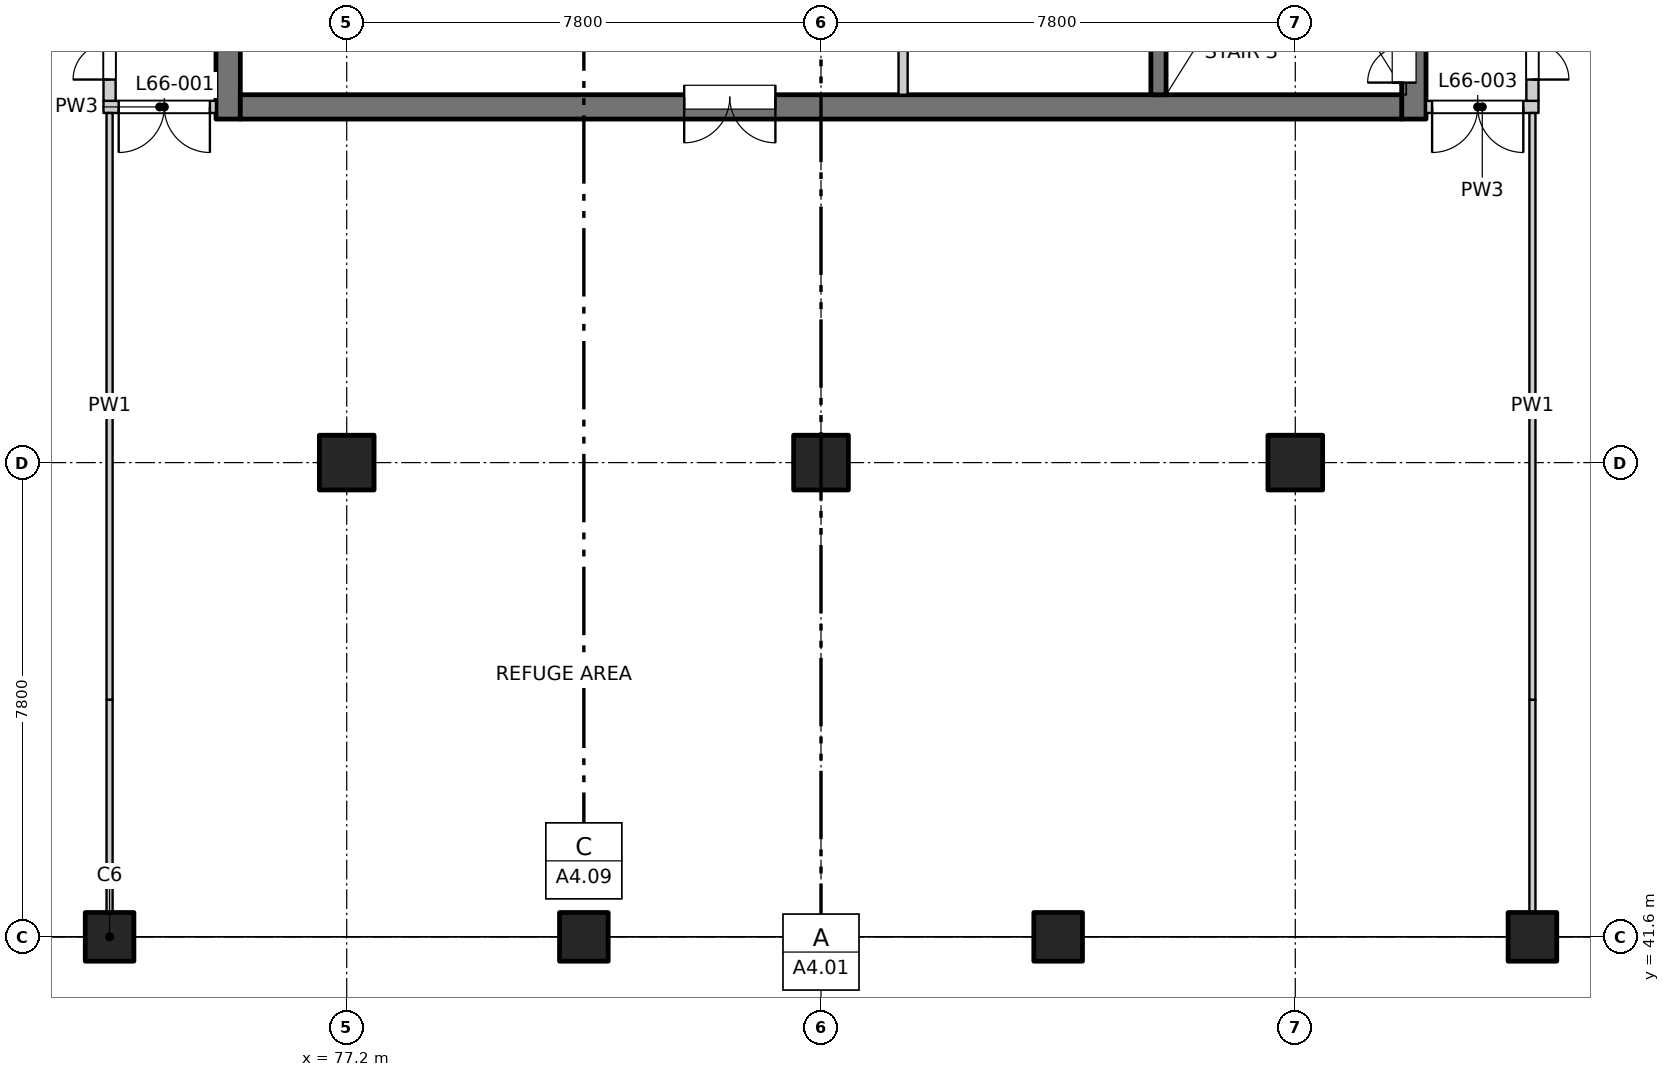
"""IFC4 building model, lengths in metres.
Left out: names, types, materials, properties, quantities, classifications, styles, units other than length and angle.
Written with IfcOpenShell. Run it as: python <this file> out.ifc"""

import sys

from ifc_helpers import new_model, si_unit, direction, frame, frame_2d, origin, origin_2d, place, context, subcontext, project, spatial, rectangle, extrude, element, fill, save


model = new_model("IFC4")
c1 = context("Model", 3, precision=1e-05, world=origin(), true_north=direction((0.0, 1.0)))
c2 = subcontext(c1, "Body", "Model", "MODEL_VIEW")
j1 = project(units=[si_unit("LENGTHUNIT", "METRE"), si_unit("PLANEANGLEUNIT", "RADIAN")], contexts=[c1])
p1 = place(None, origin())
s1 = spatial("IfcSite", under=j1, at=p1, CompositionType="ELEMENT")
p2 = place(p1, origin())
s2 = spatial("IfcBuilding", under=s1, at=p2, CompositionType="ELEMENT")
p3 = place(p2, frame((0.0, 0.0, 241.5)))
s3 = spatial("IfcBuildingStorey", under=s2, at=p3, CompositionType="ELEMENT", Elevation=241.5)
for number, where, z_axis, x_axis in (
    (1, (73.3, 41.6, -0.3), (0.0, 0.0, 1.0), (1.0, 0.0, 0.0)),
    (2, (81.1, 41.6, -0.3), (0.0, 0.0, 1.0), (1.0, 0.0, 0.0)),
    (3, (88.9, 41.6, -0.3), (0.0, 0.0, 1.0), (1.0, 0.0, 0.0)),
    (4, (96.7, 41.6, -0.3), (0.0, 0.0, 1.0), (1.0, 0.0, 0.0)),
):
    element("IfcColumn", number, at=place(p3, frame(where, z_axis=z_axis, x_axis=x_axis)), inside=s3, PredefinedType="COLUMN", context=c2, shape_type="SweptSolid", body=[
        extrude(rectangle(XDim=0.8, YDim=0.8, at=origin_2d()), origin(), (0.0, 0.0, 1.0), 4.5),
    ])
for number, where, z_axis, x_axis in (
    (5, (77.2, 49.4, -0.3), (0.0, 0.0, 1.0), (1.0, 0.0, 0.0)),
    (6, (85.0, 49.4, -0.3), (0.0, 0.0, 1.0), (1.0, 0.0, 0.0)),
    (7, (92.8, 49.4, -0.3), (0.0, 0.0, 1.0), (1.0, 0.0, 0.0)),
):
    element("IfcColumn", number, at=place(p3, frame(where, z_axis=z_axis, x_axis=x_axis)), inside=s3, PredefinedType="COLUMN", context=c2, shape_type="SweptSolid", body=[
        extrude(rectangle(XDim=0.9, YDim=0.9, at=origin_2d()), origin(), (0.0, 0.0, 1.0), 4.5),
    ])
p4 = place(p3, frame((75.25, 55.05, -0.3), z_axis=(0.0, 0.0, 1.0), x_axis=(0.0, 1.0, 0.0)))
e8 = element("IfcWall", 8, at=p4, inside=s3, PredefinedType="SOLIDWALL", context=c2, shape_type="SweptSolid", body=[
    extrude(rectangle(XDim=22.25, YDim=0.4, at=frame_2d((11.125, 0.0))), origin(), (0.0, 0.0, 1.0), 4.5),
])
p5 = place(p4, frame((7.4, 0.0, 0.3)))
e9 = element("IfcOpeningElement", 9, at=p5, cuts=e8, PredefinedType="OPENING", context=c2, shape_type="SweptSolid", body=[
    extrude(rectangle(XDim=0.9, YDim=2.1, at=frame_2d((0.45, 1.05))), frame((0.0, 0.21, 0.0), z_axis=(0.0, -1.0, 0.0), x_axis=(1.0, 0.0, 0.0)), (0.0, 0.0, 1.0), 0.42),
])
p6 = place(p4, frame((10.7, 0.0, 0.3)))
e10 = element("IfcOpeningElement", 10, at=p6, cuts=e8, PredefinedType="OPENING", context=c2, shape_type="SweptSolid", body=[
    extrude(rectangle(XDim=0.9, YDim=2.1, at=frame_2d((0.45, 1.05))), frame((0.0, 0.21, 0.0), z_axis=(0.0, -1.0, 0.0), x_axis=(1.0, 0.0, 0.0)), (0.0, 0.0, 1.0), 0.42),
])
p7 = place(p4, frame((15.2, 0.0, 0.3)))
e11 = element("IfcOpeningElement", 11, at=p7, cuts=e8, PredefinedType="OPENING", context=c2, shape_type="SweptSolid", body=[
    extrude(rectangle(XDim=0.9, YDim=2.1, at=frame_2d((0.45, 1.05))), frame((0.0, 0.21, 0.0), z_axis=(0.0, -1.0, 0.0), x_axis=(1.0, 0.0, 0.0)), (0.0, 0.0, 1.0), 0.42),
])
p8 = place(p4, frame((20.0, 0.0, 0.3)))
e12 = element("IfcOpeningElement", 12, at=p8, cuts=e8, PredefinedType="OPENING", context=c2, shape_type="SweptSolid", body=[
    extrude(rectangle(XDim=0.9, YDim=2.1, at=frame_2d((0.45, 1.05))), frame((0.0, 0.21, 0.0), z_axis=(0.0, -1.0, 0.0), x_axis=(1.0, 0.0, 0.0)), (0.0, 0.0, 1.0), 0.42),
])
p9 = place(p3, frame((94.75, 55.05, -0.3), z_axis=(0.0, 0.0, 1.0), x_axis=(0.0, 1.0, 0.0)))
e13 = element("IfcWall", 13, at=p9, inside=s3, PredefinedType="SOLIDWALL", context=c2, shape_type="SweptSolid", body=[
    extrude(rectangle(XDim=6.9, YDim=0.4, at=frame_2d((3.45, 0.0))), origin(), (0.0, 0.0, 1.0), 4.5),
])
p10 = place(p9, frame((0.6, 0.0, 0.3)))
e14 = element("IfcOpeningElement", 14, at=p10, cuts=e13, PredefinedType="OPENING", context=c2, shape_type="SweptSolid", body=[
    extrude(rectangle(XDim=1.2, YDim=2.1, at=frame_2d((0.6, 1.05))), frame((0.0, 0.21, 0.0), z_axis=(0.0, -1.0, 0.0), x_axis=(1.0, 0.0, 0.0)), (0.0, 0.0, 1.0), 0.42),
])
p11 = place(p3, frame((75.45, 55.25, -0.3), z_axis=(0.0, 0.0, 1.0), x_axis=(1.0, 0.0, 0.0)))
e15 = element("IfcWall", 15, at=p11, inside=s3, PredefinedType="SOLIDWALL", context=c2, shape_type="SweptSolid", body=[
    extrude(rectangle(XDim=19.1, YDim=0.4, at=frame_2d((9.55, 0.0))), origin(), (0.0, 0.0, 1.0), 4.5),
])
p12 = place(p11, frame((7.3, 0.0, 0.3)))
e16 = element("IfcOpeningElement", 16, at=p12, cuts=e15, PredefinedType="OPENING", context=c2, shape_type="SweptSolid", body=[
    extrude(rectangle(XDim=1.5, YDim=2.1, at=frame_2d((0.75, 1.05))), frame((0.0, 0.21, 0.0), z_axis=(0.0, -1.0, 0.0), x_axis=(1.0, 0.0, 0.0)), (0.0, 0.0, 1.0), 0.42),
])
p13 = place(p3, frame((90.55, 55.45, -0.3), z_axis=(0.0, 0.0, 1.0), x_axis=(0.0, 1.0, 0.0)))
e17 = element("IfcWall", 17, at=p13, inside=s3, PredefinedType="SOLIDWALL", context=c2, shape_type="SweptSolid", body=[
    extrude(rectangle(XDim=6.5, YDim=0.25, at=frame_2d((3.25, 0.0))), origin(), (0.0, 0.0, 1.0), 4.5),
])
p14 = place(p3, frame((73.2, 55.25, 0.0), z_axis=(0.0, 0.0, 1.0), x_axis=(1.0, 0.0, 0.0)))
e18 = element("IfcWall", 18, at=p14, inside=s3, PredefinedType="PARTITIONING", context=c2, shape_type="SweptSolid", body=[
    extrude(rectangle(XDim=1.85, YDim=0.2, at=frame_2d((0.925, 0.0))), origin(), (0.0, 0.0, 1.0), 4.2),
])
p15 = place(p14, frame((0.25, 0.0, 0.0)))
e19 = element("IfcOpeningElement", 19, at=p15, cuts=e18, PredefinedType="OPENING", context=c2, shape_type="SweptSolid", body=[
    extrude(rectangle(XDim=1.5, YDim=2.1, at=frame_2d((0.75, 1.05))), frame((0.0, 0.11, 0.0), z_axis=(0.0, -1.0, 0.0), x_axis=(1.0, 0.0, 0.0)), (0.0, 0.0, 1.0), 0.22),
])
p16 = place(p3, frame((94.95, 55.25, 0.0), z_axis=(0.0, 0.0, 1.0), x_axis=(1.0, 0.0, 0.0)))
e20 = element("IfcWall", 20, at=p16, inside=s3, PredefinedType="PARTITIONING", context=c2, shape_type="SweptSolid", body=[
    extrude(rectangle(XDim=1.85, YDim=0.2, at=frame_2d((0.925, 0.0))), origin(), (0.0, 0.0, 1.0), 4.2),
])
p17 = place(p16, frame((0.1, 0.0, 0.0)))
e21 = element("IfcOpeningElement", 21, at=p17, cuts=e20, PredefinedType="OPENING", context=c2, shape_type="SweptSolid", body=[
    extrude(rectangle(XDim=1.5, YDim=2.1, at=frame_2d((0.75, 1.05))), frame((0.0, 0.11, 0.0), z_axis=(0.0, -1.0, 0.0), x_axis=(1.0, 0.0, 0.0)), (0.0, 0.0, 1.0), 0.22),
])
p18 = place(p3, frame((73.3, 41.6, 0.0), z_axis=(0.0, 0.0, 1.0), x_axis=(0.0, 1.0, 0.0)))
e22 = element("IfcWall", 22, at=p18, inside=s3, PredefinedType="PARTITIONING", context=c2, shape_type="SweptSolid", body=[
    extrude(rectangle(XDim=3.9, YDim=0.1, at=frame_2d((1.95, 0.0))), origin(), (0.0, 0.0, 1.0), 2.6),
])
p19 = place(p3, frame((73.3, 45.5, 0.0), z_axis=(0.0, 0.0, 1.0), x_axis=(0.0, 1.0, 0.0)))
e23 = element("IfcWall", 23, at=p19, inside=s3, PredefinedType="PARTITIONING", context=c2, shape_type="SweptSolid", body=[
    extrude(rectangle(XDim=9.65, YDim=0.1, at=frame_2d((4.825, 0.0))), origin(), (0.0, 0.0, 1.0), 4.2),
])
p20 = place(p3, frame((73.3, 55.35, 0.0), z_axis=(0.0, 0.0, 1.0), x_axis=(0.0, 1.0, 0.0)))
e24 = element("IfcWall", 24, at=p20, inside=s3, PredefinedType="PARTITIONING", context=c2, shape_type="SweptSolid", body=[
    extrude(rectangle(XDim=29.15, YDim=0.2, at=frame_2d((14.575, 0.0))), origin(), (0.0, 0.0, 1.0), 4.2),
])
p21 = place(p20, frame((0.35, 0.0, 0.0)))
e25 = element("IfcOpeningElement", 25, at=p21, cuts=e24, PredefinedType="OPENING", context=c2, shape_type="SweptSolid", body=[
    extrude(rectangle(XDim=1.2, YDim=2.1, at=frame_2d((0.6, 1.05))), frame((0.0, 0.11, 0.0), z_axis=(0.0, -1.0, 0.0), x_axis=(1.0, 0.0, 0.0)), (0.0, 0.0, 1.0), 0.22),
])
p22 = place(p20, frame((7.1, 0.0, 0.0)))
e26 = element("IfcOpeningElement", 26, at=p22, cuts=e24, PredefinedType="OPENING", context=c2, shape_type="SweptSolid", body=[
    extrude(rectangle(XDim=1.2, YDim=2.1, at=frame_2d((0.6, 1.05))), frame((0.0, 0.11, 0.0), z_axis=(0.0, -1.0, 0.0), x_axis=(1.0, 0.0, 0.0)), (0.0, 0.0, 1.0), 0.22),
])
p23 = place(p20, frame((18.8, 0.0, 0.0)))
e27 = element("IfcOpeningElement", 27, at=p23, cuts=e24, PredefinedType="OPENING", context=c2, shape_type="SweptSolid", body=[
    extrude(rectangle(XDim=1.2, YDim=2.1, at=frame_2d((0.6, 1.05))), frame((0.0, 0.11, 0.0), z_axis=(0.0, -1.0, 0.0), x_axis=(1.0, 0.0, 0.0)), (0.0, 0.0, 1.0), 0.22),
])
p24 = place(p20, frame((26.6, 0.0, 0.0)))
e28 = element("IfcOpeningElement", 28, at=p24, cuts=e24, PredefinedType="OPENING", context=c2, shape_type="SweptSolid", body=[
    extrude(rectangle(XDim=1.2, YDim=2.1, at=frame_2d((0.6, 1.05))), frame((0.0, 0.11, 0.0), z_axis=(0.0, -1.0, 0.0), x_axis=(1.0, 0.0, 0.0)), (0.0, 0.0, 1.0), 0.22),
])
p25 = place(p3, frame((86.35, 55.45, 0.0), z_axis=(0.0, 0.0, 1.0), x_axis=(0.0, 1.0, 0.0)))
e29 = element("IfcWall", 29, at=p25, inside=s3, PredefinedType="PARTITIONING", context=c2, shape_type="SweptSolid", body=[
    extrude(rectangle(XDim=5.575, YDim=0.15, at=frame_2d((2.788, 0.0))), origin(), (0.0, 0.0, 1.0), 4.2),
])
p26 = place(p25, frame((2.25, 0.0, 0.0)))
e30 = element("IfcOpeningElement", 30, at=p26, cuts=e29, PredefinedType="OPENING", context=c2, shape_type="SweptSolid", body=[
    extrude(rectangle(XDim=0.9, YDim=2.1, at=frame_2d((0.45, 1.05))), frame((0.0, 0.085, 0.0), z_axis=(0.0, -1.0, 0.0), x_axis=(1.0, 0.0, 0.0)), (0.0, 0.0, 1.0), 0.17),
])
p27 = place(p3, frame((96.7, 41.6, 0.0), z_axis=(0.0, 0.0, 1.0), x_axis=(0.0, 1.0, 0.0)))
e31 = element("IfcWall", 31, at=p27, inside=s3, PredefinedType="PARTITIONING", context=c2, shape_type="SweptSolid", body=[
    extrude(rectangle(XDim=3.9, YDim=0.1, at=frame_2d((1.95, 0.0))), origin(), (0.0, 0.0, 1.0), 2.6),
])
p28 = place(p3, frame((96.7, 45.5, 0.0), z_axis=(0.0, 0.0, 1.0), x_axis=(0.0, 1.0, 0.0)))
e32 = element("IfcWall", 32, at=p28, inside=s3, PredefinedType="PARTITIONING", context=c2, shape_type="SweptSolid", body=[
    extrude(rectangle(XDim=9.65, YDim=0.1, at=frame_2d((4.825, 0.0))), origin(), (0.0, 0.0, 1.0), 4.2),
])
p29 = place(p3, frame((96.7, 55.35, 0.0), z_axis=(0.0, 0.0, 1.0), x_axis=(0.0, 1.0, 0.0)))
e33 = element("IfcWall", 33, at=p29, inside=s3, PredefinedType="PARTITIONING", context=c2, shape_type="SweptSolid", body=[
    extrude(rectangle(XDim=29.15, YDim=0.2, at=frame_2d((14.575, 0.0))), origin(), (0.0, 0.0, 1.0), 4.2),
])
p30 = place(p29, frame((0.35, 0.0, 0.0)))
e34 = element("IfcOpeningElement", 34, at=p30, cuts=e33, PredefinedType="OPENING", context=c2, shape_type="SweptSolid", body=[
    extrude(rectangle(XDim=1.2, YDim=2.1, at=frame_2d((0.6, 1.05))), frame((0.0, 0.11, 0.0), z_axis=(0.0, -1.0, 0.0), x_axis=(1.0, 0.0, 0.0)), (0.0, 0.0, 1.0), 0.22),
])
p31 = place(p29, frame((3.2, 0.0, 0.0)))
e35 = element("IfcOpeningElement", 35, at=p31, cuts=e33, PredefinedType="OPENING", context=c2, shape_type="SweptSolid", body=[
    extrude(rectangle(XDim=1.2, YDim=2.1, at=frame_2d((0.6, 1.05))), frame((0.0, 0.11, 0.0), z_axis=(0.0, -1.0, 0.0), x_axis=(1.0, 0.0, 0.0)), (0.0, 0.0, 1.0), 0.22),
])
p32 = place(p29, frame((22.7, 0.0, 0.0)))
e36 = element("IfcOpeningElement", 36, at=p32, cuts=e33, PredefinedType="OPENING", context=c2, shape_type="SweptSolid", body=[
    extrude(rectangle(XDim=1.2, YDim=2.1, at=frame_2d((0.6, 1.05))), frame((0.0, 0.11, 0.0), z_axis=(0.0, -1.0, 0.0), x_axis=(1.0, 0.0, 0.0)), (0.0, 0.0, 1.0), 0.22),
])
p33 = place(p15, origin())
e37 = element("IfcDoor", 37, at=p33, inside=s3, OperationType="DOUBLE_DOOR_SINGLE_SWING", PredefinedType="DOOR", context=c2, shape_type="SweptSolid", body=[
    extrude(rectangle(XDim=1.5, YDim=2.1, at=frame_2d((0.75, 1.05))), frame((0.0, 0.025, 0.0), z_axis=(0.0, -1.0, 0.0), x_axis=(1.0, 0.0, 0.0)), (0.0, 0.0, 1.0), 0.05),
])
fill(e19, e37)
p34 = place(p12, origin())
e38 = element("IfcDoor", 38, at=p34, inside=s3, OperationType="DOUBLE_DOOR_SINGLE_SWING", PredefinedType="DOOR", context=c2, shape_type="SweptSolid", body=[
    extrude(rectangle(XDim=1.5, YDim=2.1, at=frame_2d((0.75, 1.05))), frame((0.0, 0.185, 0.0), z_axis=(0.0, -1.0, 0.0), x_axis=(1.0, 0.0, 0.0)), (0.0, 0.0, 1.0), 0.05),
])
fill(e16, e38)
p35 = place(p17, origin())
e39 = element("IfcDoor", 39, at=p35, inside=s3, OperationType="DOUBLE_DOOR_SINGLE_SWING", PredefinedType="DOOR", context=c2, shape_type="SweptSolid", body=[
    extrude(rectangle(XDim=1.5, YDim=2.1, at=frame_2d((0.75, 1.05))), frame((0.0, 0.025, 0.0), z_axis=(0.0, -1.0, 0.0), x_axis=(1.0, 0.0, 0.0)), (0.0, 0.0, 1.0), 0.05),
])
fill(e21, e39)
p36 = place(p10, origin())
e40 = element("IfcDoor", 40, at=p36, inside=s3, OperationType="DOUBLE_DOOR_SINGLE_SWING", PredefinedType="DOOR", context=c2, shape_type="SweptSolid", body=[
    extrude(rectangle(XDim=1.2, YDim=2.1, at=frame_2d((0.6, 1.05))), frame((0.0, 0.185, 0.0), z_axis=(0.0, -1.0, 0.0), x_axis=(1.0, 0.0, 0.0)), (0.0, 0.0, 1.0), 0.05),
])
fill(e14, e40)
p37 = place(p21, origin())
e41 = element("IfcDoor", 41, at=p37, inside=s3, OperationType="DOUBLE_DOOR_SINGLE_SWING", PredefinedType="DOOR", context=c2, shape_type="SweptSolid", body=[
    extrude(rectangle(XDim=1.2, YDim=2.1, at=frame_2d((0.6, 1.05))), frame((0.0, 0.025, 0.0), z_axis=(0.0, -1.0, 0.0), x_axis=(1.0, 0.0, 0.0)), (0.0, 0.0, 1.0), 0.05),
])
fill(e25, e41)
p38 = place(p30, origin())
e42 = element("IfcDoor", 42, at=p38, inside=s3, OperationType="DOUBLE_DOOR_SINGLE_SWING", PredefinedType="DOOR", context=c2, shape_type="SweptSolid", body=[
    extrude(rectangle(XDim=1.2, YDim=2.1, at=frame_2d((0.6, 1.05))), frame((0.0, 0.025, 0.0), z_axis=(0.0, -1.0, 0.0), x_axis=(1.0, 0.0, 0.0)), (0.0, 0.0, 1.0), 0.05),
])
fill(e34, e42)
save(model, sys.argv[1])
